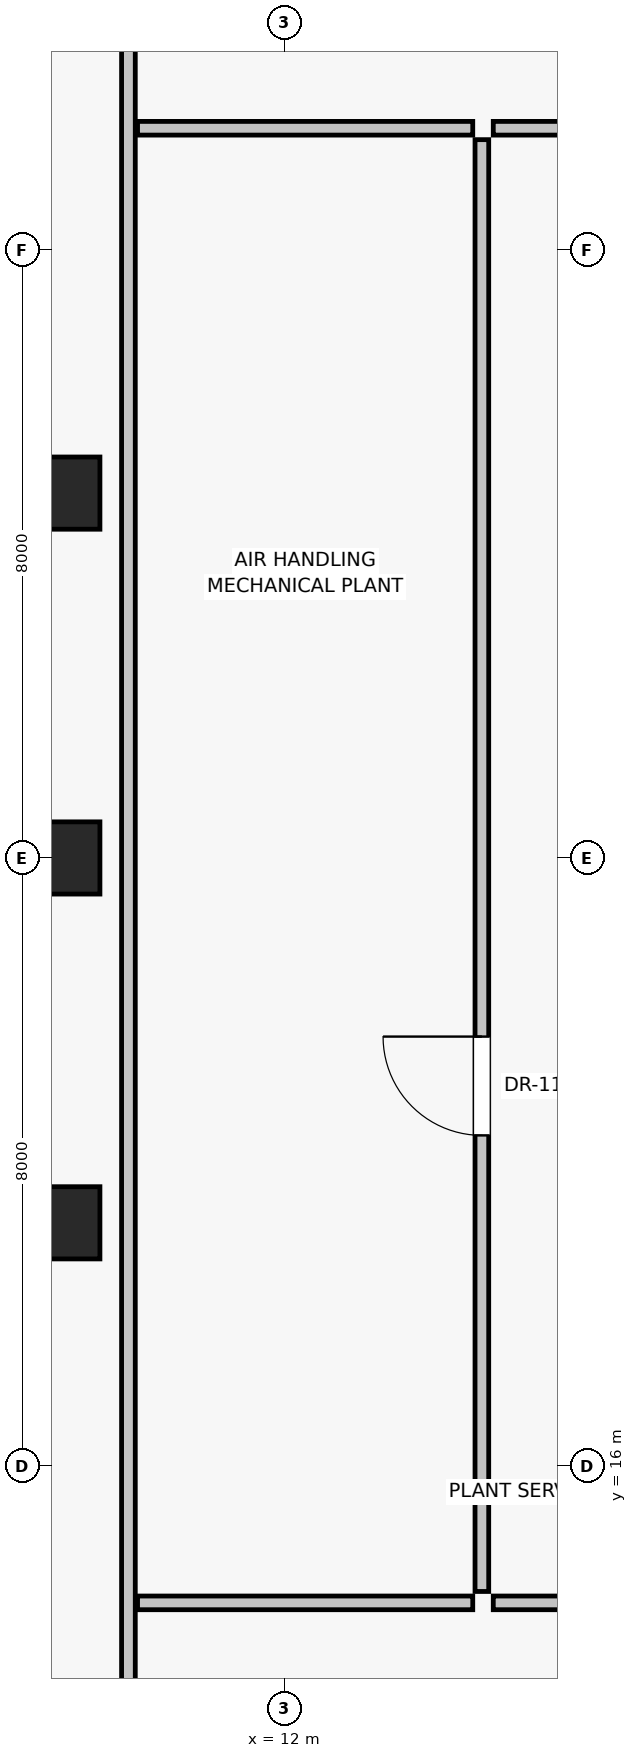
"""IFC4 building model, lengths in metres.
Left out: names, types, materials, properties, quantities, classifications, styles, units other than length and angle.
Written with IfcOpenShell. Run it as: python <this file> out.ifc"""

import sys

from ifc_helpers import new_model, si_unit, direction, frame, frame_2d, origin, origin_2d, place, context, subcontext, project, spatial, rectangle, extrude, source, transform, mapped, element, fill, save


model = new_model("IFC4")
c1 = context("Model", 3, precision=1e-05, world=origin(), true_north=direction((0.0, 1.0)))
c2 = subcontext(c1, "Body", "Model", "MODEL_VIEW")
j1 = project(units=[si_unit("LENGTHUNIT", "METRE"), si_unit("PLANEANGLEUNIT", "RADIAN")], contexts=[c1])
p1 = place(None, origin())
s1 = spatial("IfcSite", under=j1, at=p1, CompositionType="ELEMENT")
p2 = place(p1, origin())
s2 = spatial("IfcBuilding", under=s1, at=p2, CompositionType="ELEMENT")
p3 = place(p2, frame((0.0, 0.0, 225.4)))
s3 = spatial("IfcBuildingStorey", under=s2, at=p3, CompositionType="ELEMENT", Elevation=225.4)
for number, where, z_axis, x_axis in (
    (1, (9.1, 28.8, 0.0), (0.0, 0.0, 1.0), (1.0, 0.0, 0.0)),
    (2, (9.1, 24.0, 0.0), (0.0, 0.0, 1.0), (1.0, 0.0, 0.0)),
    (3, (9.1, 19.2, 0.0), (0.0, 0.0, 1.0), (1.0, 0.0, 0.0)),
):
    element("IfcColumn", number, at=place(p3, frame(where, z_axis=z_axis, x_axis=x_axis)), inside=s3, PredefinedType="COLUMN", context=c2, shape_type="SweptSolid", body=[
        extrude(rectangle(XDim=0.95, YDim=0.95, at=origin_2d()), origin(), (0.0, 0.0, 1.0), 4.65),
    ])
p4 = place(p3, frame((14.75, 14.2, 0.0), z_axis=(0.0, 0.0, 1.0), x_axis=(1.0, 0.0, 0.0)))
e4 = element("IfcWall", 4, at=p4, inside=s3, PredefinedType="PARTITIONING", context=c2, shape_type="SweptSolid", body=[
    extrude(rectangle(XDim=18.5, YDim=0.18, at=frame_2d((9.25, 0.0))), origin(), (0.0, 0.0, 1.0), 4.415),
])
p5 = place(p4, frame((6.0, 0.0, 0.0)))
e5 = element("IfcOpeningElement", 5, at=p5, cuts=e4, PredefinedType="OPENING", context=c2, shape_type="SweptSolid", body=[
    extrude(rectangle(XDim=1.1, YDim=2.03, at=frame_2d((0.55, 1.015))), frame((0.0, 0.1, 0.0), z_axis=(0.0, -1.0, 0.0), x_axis=(1.0, 0.0, 0.0)), (0.0, 0.0, 1.0), 0.2),
])
p6 = place(p3, frame((14.75, 33.6, 0.0), z_axis=(0.0, 0.0, 1.0), x_axis=(1.0, 0.0, 0.0)))
e6 = element("IfcWall", 6, at=p6, inside=s3, PredefinedType="PARTITIONING", context=c2, shape_type="SweptSolid", body=[
    extrude(rectangle(XDim=18.5, YDim=0.18, at=frame_2d((9.25, 0.0))), origin(), (0.0, 0.0, 1.0), 4.415),
])
p7 = place(p6, frame((6.0, 0.0, 0.0)))
e7 = element("IfcOpeningElement", 7, at=p7, cuts=e6, PredefinedType="OPENING", context=c2, shape_type="SweptSolid", body=[
    extrude(rectangle(XDim=1.1, YDim=2.03, at=frame_2d((0.55, 1.015))), frame((0.0, 0.1, 0.0), z_axis=(0.0, -1.0, 0.0), x_axis=(1.0, 0.0, 0.0)), (0.0, 0.0, 1.0), 0.2),
])
p8 = place(p3, frame((14.6, 14.35, 0.0), z_axis=(0.0, 0.0, 1.0), x_axis=(0.0, 1.0, 0.0)))
e8 = element("IfcWall", 8, at=p8, inside=s3, PredefinedType="PARTITIONING", context=c2, shape_type="SweptSolid", body=[
    extrude(rectangle(XDim=19.1, YDim=0.18, at=frame_2d((9.55, 0.0))), origin(), (0.0, 0.0, 1.0), 4.415),
])
p9 = place(p8, frame((6.0, 0.0, 0.0)))
e9 = element("IfcOpeningElement", 9, at=p9, cuts=e8, PredefinedType="OPENING", context=c2, shape_type="SweptSolid", body=[
    extrude(rectangle(XDim=1.3, YDim=2.3, at=frame_2d((0.65, 1.15))), frame((0.0, 0.1, 0.0), z_axis=(0.0, -1.0, 0.0), x_axis=(1.0, 0.0, 0.0)), (0.0, 0.0, 1.0), 0.2),
])
p10 = place(p3, frame((9.95, 10.07, 0.0), z_axis=(0.0, 0.0, 1.0), x_axis=(0.0, 1.0, 0.0)))
e10 = element("IfcWall", 10, at=p10, inside=s3, PredefinedType="PARTITIONING", context=c2, shape_type="SweptSolid", body=[
    extrude(rectangle(XDim=27.86, YDim=0.18, at=frame_2d((13.93, 0.0))), origin(), (0.0, 0.0, 1.0), 2.215),
])
for number, where, z_axis, x_axis in (
    (11, (10.07, 14.2, 0.0), (0.0, 0.0, 1.0), (1.0, 0.0, 0.0)),
    (12, (10.07, 33.6, 0.0), (0.0, 0.0, 1.0), (1.0, 0.0, 0.0)),
):
    element("IfcWall", number, at=place(p3, frame(where, z_axis=z_axis, x_axis=x_axis)), inside=s3, PredefinedType="PARTITIONING", context=c2, shape_type="SweptSolid", body=[
        extrude(rectangle(XDim=4.41, YDim=0.18, at=frame_2d((2.205, 0.0))), origin(), (0.0, 0.0, 1.0), 4.415),
    ])
m1 = source(origin(), c2, "Body", "SweptSolid", [
    extrude(rectangle(XDim=1.3, YDim=2.3, at=frame_2d((0.65, 1.15))), frame((0.0, 0.025, 0.0), z_axis=(0.0, -1.0, 0.0), x_axis=(1.0, 0.0, 0.0)), (0.0, 0.0, 1.0), 0.05),
])
p11 = place(p9, origin())
e13 = element("IfcDoor", 13, at=p11, inside=s3, OperationType="SINGLE_SWING_RIGHT", PredefinedType="DOOR", context=c2, shape_type="MappedRepresentation", body=[
    mapped(m1, transform((0.0, 0.0, 0.0), scale=1.0)),
])
fill(e9, e13)
save(model, sys.argv[1])
